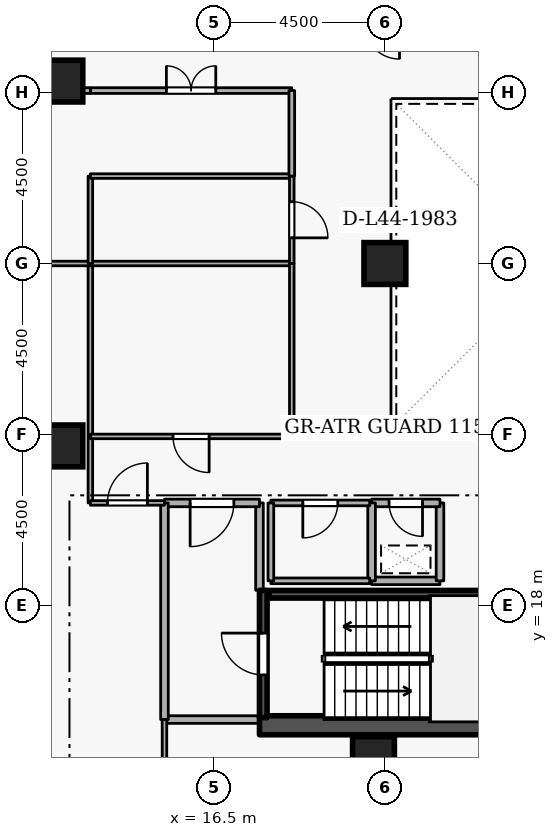
"""IFC4 building model, lengths in metres.
Left out: names, types, materials, properties, quantities, classifications, styles, units other than length and angle.
Written with IfcOpenShell. Run it as: python <this file> out.ifc"""

import sys

from ifc_helpers import new_model, si_unit, direction, frame, frame_2d, origin, origin_2d, place, context, subcontext, project, spatial, rectangle, extrude, element, fill, save


model = new_model("IFC4")
c1 = context("Model", 3, precision=1e-05, world=origin(), true_north=direction((0.0, 1.0)))
c2 = subcontext(c1, "Body", "Model", "MODEL_VIEW")
j1 = project(units=[si_unit("LENGTHUNIT", "METRE"), si_unit("PLANEANGLEUNIT", "RADIAN")], contexts=[c1])
p1 = place(None, origin())
s1 = spatial("IfcSite", under=j1, at=p1, CompositionType="ELEMENT")
p2 = place(p1, origin())
s2 = spatial("IfcBuilding", under=s1, at=p2, CompositionType="ELEMENT")
p3 = place(p2, frame((0.0, 0.0, 167.1)))
s3 = spatial("IfcBuildingStorey", under=s2, at=p3, CompositionType="ELEMENT", Elevation=167.1)
p4 = place(p3, frame((17.7, 14.85, 0.0), z_axis=(0.0, 0.0, 1.0), x_axis=(1.0, 0.0, 0.0)))
e1 = element("IfcWall", 1, at=p4, inside=s3, PredefinedType="SHEAR", context=c2, shape_type="SweptSolid", body=[
    extrude(rectangle(XDim=15.6, YDim=0.5, at=frame_2d((7.8, 0.0))), origin(), (0.0, 0.0, 1.0), 3.6),
])
for number, where, z_axis, x_axis in (
    (2, (12.5, 22.2, 0.0), (0.0, 0.0, 1.0), (1.0, 0.0, 0.0)),
    (3, (12.5, 31.8, 0.0), (0.0, 0.0, 1.0), (1.0, 0.0, 0.0)),
    (4, (20.7, 14.0, 0.0), (0.0, 0.0, 1.0), (1.0, 0.0, 0.0)),
    (5, (21.0, 27.0, 0.0), (0.0, 0.0, 1.0), (1.0, 0.0, 0.0)),
):
    element("IfcColumn", number, at=place(p3, frame(where, z_axis=z_axis, x_axis=x_axis)), inside=s3, PredefinedType="COLUMN", context=c2, shape_type="SweptSolid", body=[
        extrude(rectangle(XDim=1.1, YDim=1.1, at=origin_2d()), origin(), (0.0, 0.0, 1.0), 3.6),
    ])
p5 = place(p3, frame((17.8, 15.05, 0.0), z_axis=(0.0, 0.0, 1.0), x_axis=(0.0, 1.0, 0.0)))
e6 = element("IfcWall", 6, at=p5, inside=s3, PredefinedType="SHEAR", context=c2, shape_type="SweptSolid", body=[
    extrude(rectangle(XDim=3.35, YDim=0.2, at=frame_2d((1.675, 0.0))), origin(), (0.0, 0.0, 1.0), 3.6),
])
p6 = place(p5, frame((1.125, 0.0, 0.0)))
e7 = element("IfcOpeningElement", 7, at=p6, cuts=e6, PredefinedType="OPENING", context=c2, shape_type="SweptSolid", body=[
    extrude(rectangle(XDim=1.1, YDim=2.1, at=frame_2d((0.55, 1.05))), frame((0.0, 0.11, 0.0), z_axis=(0.0, -1.0, 0.0), x_axis=(1.0, 0.0, 0.0)), (0.0, 0.0, 1.0), 0.22),
])
p7 = place(p3, frame((25.05, 18.297, 0.0), z_axis=(0.0, 0.0, 1.0), x_axis=(-1.0, 0.0, 0.0)))
e8 = element("IfcWall", 8, at=p7, inside=s3, PredefinedType="SHEAR", context=c2, shape_type="SweptSolid", body=[
    extrude(rectangle(XDim=7.1, YDim=0.2, at=frame_2d((3.55, 0.0))), origin(), (0.0, 0.0, 1.0), 3.6),
])
p8 = place(p3, frame((15.2, 15.0, 0.0), z_axis=(0.0, 0.0, 1.0), x_axis=(1.0, 0.0, 0.0)))
e9 = element("IfcWall", 9, at=p8, inside=s3, PredefinedType="STANDARD", context=c2, shape_type="SweptSolid", body=[
    extrude(rectangle(XDim=2.5, YDim=0.2, at=frame_2d((1.25, 0.0))), origin(), (0.0, 0.0, 1.0), 3.34),
])
p9 = place(p3, frame((17.7, 18.4, 0.0), z_axis=(0.0, 0.0, 1.0), x_axis=(0.0, 1.0, 0.0)))
e10 = element("IfcWall", 10, at=p9, inside=s3, PredefinedType="STANDARD", context=c2, shape_type="SweptSolid", body=[
    extrude(rectangle(XDim=2.3, YDim=0.2, at=frame_2d((1.15, 0.0))), origin(), (0.0, 0.0, 1.0), 2.545),
])
p10 = place(p3, frame((17.7, 20.7, 0.0), z_axis=(0.0, 0.0, 1.0), x_axis=(-1.0, 0.0, 0.0)))
e11 = element("IfcWall", 11, at=p10, inside=s3, PredefinedType="STANDARD", context=c2, shape_type="SweptSolid", body=[
    extrude(rectangle(XDim=2.5, YDim=0.2, at=frame_2d((1.25, 0.0))), origin(), (0.0, 0.0, 1.0), 3.34),
])
p11 = place(p10, frame((0.675, 0.0, 0.0)))
e12 = element("IfcOpeningElement", 12, at=p11, cuts=e11, PredefinedType="OPENING", context=c2, shape_type="SweptSolid", body=[
    extrude(rectangle(XDim=1.15, YDim=2.1, at=frame_2d((0.575, 1.05))), frame((0.0, 0.11, 0.0), z_axis=(0.0, -1.0, 0.0), x_axis=(1.0, 0.0, 0.0)), (0.0, 0.0, 1.0), 0.22),
])
p12 = place(p3, frame((15.2, 20.7, 0.0), z_axis=(0.0, 0.0, 1.0), x_axis=(0.0, -1.0, 0.0)))
e13 = element("IfcWall", 13, at=p12, inside=s3, PredefinedType="STANDARD", context=c2, shape_type="SweptSolid", body=[
    extrude(rectangle(XDim=5.7, YDim=0.2, at=frame_2d((2.85, 0.0))), origin(), (0.0, 0.0, 1.0), 3.34),
])
p13 = place(p3, frame((20.65, 18.65, 0.0), z_axis=(0.0, 0.0, 1.0), x_axis=(1.0, 0.0, 0.0)))
e14 = element("IfcWall", 14, at=p13, inside=s3, PredefinedType="STANDARD", context=c2, shape_type="SweptSolid", body=[
    extrude(rectangle(XDim=1.8, YDim=0.2, at=frame_2d((0.9, 0.0))), origin(), (0.0, 0.0, 1.0), 3.34),
])
p14 = place(p3, frame((22.45, 18.65, 0.0), z_axis=(0.0, 0.0, 1.0), x_axis=(0.0, 1.0, 0.0)))
e15 = element("IfcWall", 15, at=p14, inside=s3, PredefinedType="STANDARD", context=c2, shape_type="SweptSolid", body=[
    extrude(rectangle(XDim=2.05, YDim=0.2, at=frame_2d((1.025, 0.0))), origin(), (0.0, 0.0, 1.0), 3.34),
])
p15 = place(p3, frame((22.45, 20.7, 0.0), z_axis=(0.0, 0.0, 1.0), x_axis=(-1.0, 0.0, 0.0)))
e16 = element("IfcWall", 16, at=p15, inside=s3, PredefinedType="STANDARD", context=c2, shape_type="SweptSolid", body=[
    extrude(rectangle(XDim=1.8, YDim=0.2, at=frame_2d((0.9, 0.0))), origin(), (0.0, 0.0, 1.0), 3.34),
])
p16 = place(p15, frame((0.46, 0.0, 0.0)))
e17 = element("IfcOpeningElement", 17, at=p16, cuts=e16, PredefinedType="OPENING", context=c2, shape_type="SweptSolid", body=[
    extrude(rectangle(XDim=0.88, YDim=2.04, at=frame_2d((0.44, 1.02))), frame((0.0, 0.11, 0.0), z_axis=(0.0, -1.0, 0.0), x_axis=(1.0, 0.0, 0.0)), (0.0, 0.0, 1.0), 0.22),
])
p17 = place(p3, frame((20.65, 20.7, 0.0), z_axis=(0.0, 0.0, 1.0), x_axis=(0.0, -1.0, 0.0)))
e18 = element("IfcWall", 18, at=p17, inside=s3, PredefinedType="STANDARD", context=c2, shape_type="SweptSolid", body=[
    extrude(rectangle(XDim=2.05, YDim=0.2, at=frame_2d((1.025, 0.0))), origin(), (0.0, 0.0, 1.0), 3.34),
])
p18 = place(p3, frame((18.0, 18.65, 0.0), z_axis=(0.0, 0.0, 1.0), x_axis=(1.0, 0.0, 0.0)))
e19 = element("IfcWall", 19, at=p18, inside=s3, PredefinedType="PARTITIONING", context=c2, shape_type="SweptSolid", body=[
    extrude(rectangle(XDim=2.6, YDim=0.15, at=frame_2d((1.3, 0.0))), origin(), (0.0, 0.0, 1.0), 3.34),
])
p19 = place(p3, frame((20.6, 20.7, 0.0), z_axis=(0.0, 0.0, 1.0), x_axis=(-1.0, 0.0, 0.0)))
e20 = element("IfcWall", 20, at=p19, inside=s3, PredefinedType="PARTITIONING", context=c2, shape_type="SweptSolid", body=[
    extrude(rectangle(XDim=2.6, YDim=0.15, at=frame_2d((1.3, 0.0))), origin(), (0.0, 0.0, 1.0), 3.34),
])
p20 = place(p19, frame((0.84, 0.0, 0.0)))
e21 = element("IfcOpeningElement", 21, at=p20, cuts=e20, PredefinedType="OPENING", context=c2, shape_type="SweptSolid", body=[
    extrude(rectangle(XDim=0.92, YDim=2.08, at=frame_2d((0.46, 1.04))), frame((0.0, 0.085, 0.0), z_axis=(0.0, -1.0, 0.0), x_axis=(1.0, 0.0, 0.0)), (0.0, 0.0, 1.0), 0.17),
])
p21 = place(p3, frame((18.0, 20.7, 0.0), z_axis=(0.0, 0.0, 1.0), x_axis=(0.0, -1.0, 0.0)))
e22 = element("IfcWall", 22, at=p21, inside=s3, PredefinedType="PARTITIONING", context=c2, shape_type="SweptSolid", body=[
    extrude(rectangle(XDim=2.05, YDim=0.15, at=frame_2d((1.025, 0.0))), origin(), (0.0, 0.0, 1.0), 2.545),
])
p22 = place(p3, frame((13.25, 27.0, 0.0), z_axis=(0.0, 0.0, 1.0), x_axis=(0.0, -1.0, 0.0)))
e23 = element("IfcWall", 23, at=p22, inside=s3, PredefinedType="PARTITIONING", context=c2, shape_type="SweptSolid", body=[
    extrude(rectangle(XDim=4.55, YDim=0.12, at=frame_2d((2.275, 0.0))), origin(), (0.0, 0.0, 1.0), 3.34),
])
p23 = place(p3, frame((13.25, 22.45, 0.0), z_axis=(0.0, 0.0, 1.0), x_axis=(0.0, -1.0, 0.0)))
e24 = element("IfcWall", 24, at=p23, inside=s3, PredefinedType="PARTITIONING", context=c2, shape_type="SweptSolid", body=[
    extrude(rectangle(XDim=1.75, YDim=0.12, at=frame_2d((0.875, 0.0))), origin(), (0.0, 0.0, 1.0), 3.34),
])
p24 = place(p3, frame((13.25, 20.7, 0.0), z_axis=(0.0, 0.0, 1.0), x_axis=(1.0, 0.0, 0.0)))
e25 = element("IfcWall", 25, at=p24, inside=s3, PredefinedType="PARTITIONING", context=c2, shape_type="SweptSolid", body=[
    extrude(rectangle(XDim=1.95, YDim=0.12, at=frame_2d((0.975, 0.0))), origin(), (0.0, 0.0, 1.0), 3.34),
])
p25 = place(p24, frame((0.45, 0.0, 0.0)))
e26 = element("IfcOpeningElement", 26, at=p25, cuts=e25, PredefinedType="OPENING", context=c2, shape_type="SweptSolid", body=[
    extrude(rectangle(XDim=1.05, YDim=2.1, at=frame_2d((0.525, 1.05))), frame((0.0, 0.07, 0.0), z_axis=(0.0, -1.0, 0.0), x_axis=(1.0, 0.0, 0.0)), (0.0, 0.0, 1.0), 0.14),
])
p26 = place(p3, frame((15.2, 15.0, 0.0), z_axis=(0.0, 0.0, 1.0), x_axis=(0.0, -1.0, 0.0)))
e27 = element("IfcWall", 27, at=p26, inside=s3, PredefinedType="PARTITIONING", context=c2, shape_type="SweptSolid", body=[
    extrude(rectangle(XDim=11.72, YDim=0.12, at=frame_2d((5.86, 0.0))), origin(), (0.0, 0.0, 1.0), 3.34),
])
p27 = place(p3, frame((7.78, 27.0, 0.0), z_axis=(0.0, 0.0, 1.0), x_axis=(1.0, 0.0, 0.0)))
e28 = element("IfcWall", 28, at=p27, inside=s3, PredefinedType="PARTITIONING", context=c2, shape_type="SweptSolid", body=[
    extrude(rectangle(XDim=5.47, YDim=0.12, at=frame_2d((2.735, 0.0))), origin(), (0.0, 0.0, 1.0), 2.882),
])
p28 = place(p3, frame((13.25, 27.0, 0.0), z_axis=(0.0, 0.0, 1.0), x_axis=(1.0, 0.0, 0.0)))
e29 = element("IfcWall", 29, at=p28, inside=s3, PredefinedType="PARTITIONING", context=c2, shape_type="SweptSolid", body=[
    extrude(rectangle(XDim=5.3, YDim=0.12, at=frame_2d((2.65, 0.0))), origin(), (0.0, 0.0, 1.0), 2.882),
])
p29 = place(p3, frame((18.55, 27.0, 0.0), z_axis=(0.0, 0.0, 1.0), x_axis=(0.0, -1.0, 0.0)))
e30 = element("IfcWall", 30, at=p29, inside=s3, PredefinedType="PARTITIONING", context=c2, shape_type="SweptSolid", body=[
    extrude(rectangle(XDim=4.55, YDim=0.12, at=frame_2d((2.275, 0.0))), origin(), (0.0, 0.0, 1.0), 3.34),
])
p30 = place(p3, frame((18.55, 22.45, 0.0), z_axis=(0.0, 0.0, 1.0), x_axis=(-1.0, 0.0, 0.0)))
e31 = element("IfcWall", 31, at=p30, inside=s3, PredefinedType="PARTITIONING", context=c2, shape_type="SweptSolid", body=[
    extrude(rectangle(XDim=5.3, YDim=0.12, at=frame_2d((2.65, 0.0))), origin(), (0.0, 0.0, 1.0), 3.34),
])
p31 = place(p30, frame((2.175, 0.0, 0.0)))
e32 = element("IfcOpeningElement", 32, at=p31, cuts=e31, PredefinedType="OPENING", context=c2, shape_type="SweptSolid", body=[
    extrude(rectangle(XDim=0.95, YDim=2.1, at=frame_2d((0.475, 1.05))), frame((0.0, 0.07, 0.0), z_axis=(0.0, -1.0, 0.0), x_axis=(1.0, 0.0, 0.0)), (0.0, 0.0, 1.0), 0.14),
])
p32 = place(p3, frame((13.25, 27.0, 0.0), z_axis=(0.0, 0.0, 1.0), x_axis=(0.0, 1.0, 0.0)))
e33 = element("IfcWall", 33, at=p32, inside=s3, PredefinedType="PARTITIONING", context=c2, shape_type="SweptSolid", body=[
    extrude(rectangle(XDim=2.3, YDim=0.12, at=frame_2d((1.15, 0.0))), origin(), (0.0, 0.0, 1.0), 3.34),
])
p33 = place(p3, frame((13.25, 29.3, 0.0), z_axis=(0.0, 0.0, 1.0), x_axis=(1.0, 0.0, 0.0)))
e34 = element("IfcWall", 34, at=p33, inside=s3, PredefinedType="PARTITIONING", context=c2, shape_type="SweptSolid", body=[
    extrude(rectangle(XDim=5.3, YDim=0.12, at=frame_2d((2.65, 0.0))), origin(), (0.0, 0.0, 1.0), 3.34),
])
p34 = place(p3, frame((18.55, 29.3, 0.0), z_axis=(0.0, 0.0, 1.0), x_axis=(0.0, -1.0, 0.0)))
e35 = element("IfcWall", 35, at=p34, inside=s3, PredefinedType="PARTITIONING", context=c2, shape_type="SweptSolid", body=[
    extrude(rectangle(XDim=2.3, YDim=0.12, at=frame_2d((1.15, 0.0))), origin(), (0.0, 0.0, 1.0), 3.34),
])
p35 = place(p34, frame((0.675, 0.0, 0.0)))
e36 = element("IfcOpeningElement", 36, at=p35, cuts=e35, PredefinedType="OPENING", context=c2, shape_type="SweptSolid", body=[
    extrude(rectangle(XDim=0.95, YDim=2.1, at=frame_2d((0.475, 1.05))), frame((0.0, 0.07, 0.0), z_axis=(0.0, -1.0, 0.0), x_axis=(1.0, 0.0, 0.0)), (0.0, 0.0, 1.0), 0.14),
])
p36 = place(p3, frame((13.25, 31.55, 0.0), z_axis=(0.0, 0.0, 1.0), x_axis=(1.0, 0.0, 0.0)))
e37 = element("IfcWall", 37, at=p36, inside=s3, PredefinedType="PARTITIONING", context=c2, shape_type="SweptSolid", body=[
    extrude(rectangle(XDim=5.3, YDim=0.15, at=frame_2d((2.65, 0.0))), origin(), (0.0, 0.0, 1.0), 3.34),
])
p37 = place(p36, frame((2.0, 0.0, 0.0)))
e38 = element("IfcOpeningElement", 38, at=p37, cuts=e37, PredefinedType="OPENING", context=c2, shape_type="SweptSolid", body=[
    extrude(rectangle(XDim=1.3, YDim=2.12, at=frame_2d((0.65, 1.06))), frame((0.0, 0.085, 0.0), z_axis=(0.0, -1.0, 0.0), x_axis=(1.0, 0.0, 0.0)), (0.0, 0.0, 1.0), 0.17),
])
p38 = place(p3, frame((18.55, 31.55, 0.0), z_axis=(0.0, 0.0, 1.0), x_axis=(0.0, -1.0, 0.0)))
e39 = element("IfcWall", 39, at=p38, inside=s3, PredefinedType="PARTITIONING", context=c2, shape_type="SweptSolid", body=[
    extrude(rectangle(XDim=2.25, YDim=0.15, at=frame_2d((1.125, 0.0))), origin(), (0.0, 0.0, 1.0), 3.34),
])
p39 = place(p3, frame((10.9, 31.55, 0.0), z_axis=(0.0, 0.0, 1.0), x_axis=(1.0, 0.0, 0.0)))
e40 = element("IfcWall", 40, at=p39, inside=s3, PredefinedType="PARTITIONING", context=c2, shape_type="SweptSolid", body=[
    extrude(rectangle(XDim=2.35, YDim=0.15, at=frame_2d((1.175, 0.0))), origin(), (0.0, 0.0, 1.0), 3.34),
])
p40 = place(p6, origin())
e41 = element("IfcDoor", 41, at=p40, inside=s3, OperationType="SINGLE_SWING_RIGHT", PredefinedType="DOOR", context=c2, shape_type="SweptSolid", body=[
    extrude(rectangle(XDim=1.1, YDim=2.1, at=frame_2d((0.55, 1.05))), frame((0.0, 0.025, 0.0), z_axis=(0.0, -1.0, 0.0), x_axis=(1.0, 0.0, 0.0)), (0.0, 0.0, 1.0), 0.05),
])
fill(e7, e41)
p41 = place(p11, origin())
e42 = element("IfcDoor", 42, at=p41, inside=s3, OperationType="SINGLE_SWING_RIGHT", PredefinedType="DOOR", context=c2, shape_type="SweptSolid", body=[
    extrude(rectangle(XDim=1.15, YDim=2.1, at=frame_2d((0.575, 1.05))), frame((0.0, 0.025, 0.0), z_axis=(0.0, -1.0, 0.0), x_axis=(1.0, 0.0, 0.0)), (0.0, 0.0, 1.0), 0.05),
])
fill(e12, e42)
p42 = place(p16, origin())
e43 = element("IfcDoor", 43, at=p42, inside=s3, OperationType="SINGLE_SWING_LEFT", PredefinedType="DOOR", context=c2, shape_type="SweptSolid", body=[
    extrude(rectangle(XDim=0.88, YDim=2.04, at=frame_2d((0.44, 1.02))), frame((0.0, 0.025, 0.0), z_axis=(0.0, -1.0, 0.0), x_axis=(1.0, 0.0, 0.0)), (0.0, 0.0, 1.0), 0.05),
])
fill(e17, e43)
p43 = place(p20, origin())
e44 = element("IfcDoor", 44, at=p43, inside=s3, OperationType="SINGLE_SWING_RIGHT", PredefinedType="DOOR", context=c2, shape_type="SweptSolid", body=[
    extrude(rectangle(XDim=0.92, YDim=2.08, at=frame_2d((0.46, 1.04))), frame((0.0, 0.025, 0.0), z_axis=(0.0, -1.0, 0.0), x_axis=(1.0, 0.0, 0.0)), (0.0, 0.0, 1.0), 0.05),
])
fill(e21, e44)
p44 = place(p25, origin())
e45 = element("IfcDoor", 45, at=p44, inside=s3, OperationType="SINGLE_SWING_RIGHT", PredefinedType="DOOR", context=c2, shape_type="SweptSolid", body=[
    extrude(rectangle(XDim=1.05, YDim=2.1, at=frame_2d((0.525, 1.05))), frame((0.0, 0.025, 0.0), z_axis=(0.0, -1.0, 0.0), x_axis=(1.0, 0.0, 0.0)), (0.0, 0.0, 1.0), 0.05),
])
fill(e26, e45)
p45 = place(p31, origin())
e46 = element("IfcDoor", 46, at=p45, inside=s3, OperationType="SINGLE_SWING_LEFT", PredefinedType="DOOR", context=c2, shape_type="SweptSolid", body=[
    extrude(rectangle(XDim=0.95, YDim=2.1, at=frame_2d((0.475, 1.05))), frame((0.0, 0.025, 0.0), z_axis=(0.0, -1.0, 0.0), x_axis=(1.0, 0.0, 0.0)), (0.0, 0.0, 1.0), 0.05),
])
fill(e32, e46)
p46 = place(p35, origin())
e47 = element("IfcDoor", 47, at=p46, inside=s3, OperationType="SINGLE_SWING_RIGHT", PredefinedType="DOOR", context=c2, shape_type="SweptSolid", body=[
    extrude(rectangle(XDim=0.95, YDim=2.1, at=frame_2d((0.475, 1.05))), frame((0.0, 0.025, 0.0), z_axis=(0.0, -1.0, 0.0), x_axis=(1.0, 0.0, 0.0)), (0.0, 0.0, 1.0), 0.05),
])
fill(e36, e47)
p47 = place(p37, origin())
e48 = element("IfcDoor", 48, at=p47, inside=s3, OperationType="DOUBLE_DOOR_SINGLE_SWING", PredefinedType="DOOR", context=c2, shape_type="SweptSolid", body=[
    extrude(rectangle(XDim=1.3, YDim=2.12, at=frame_2d((0.65, 1.06))), frame((0.0, 0.025, 0.0), z_axis=(0.0, -1.0, 0.0), x_axis=(1.0, 0.0, 0.0)), (0.0, 0.0, 1.0), 0.05),
])
fill(e38, e48)
save(model, sys.argv[1])
